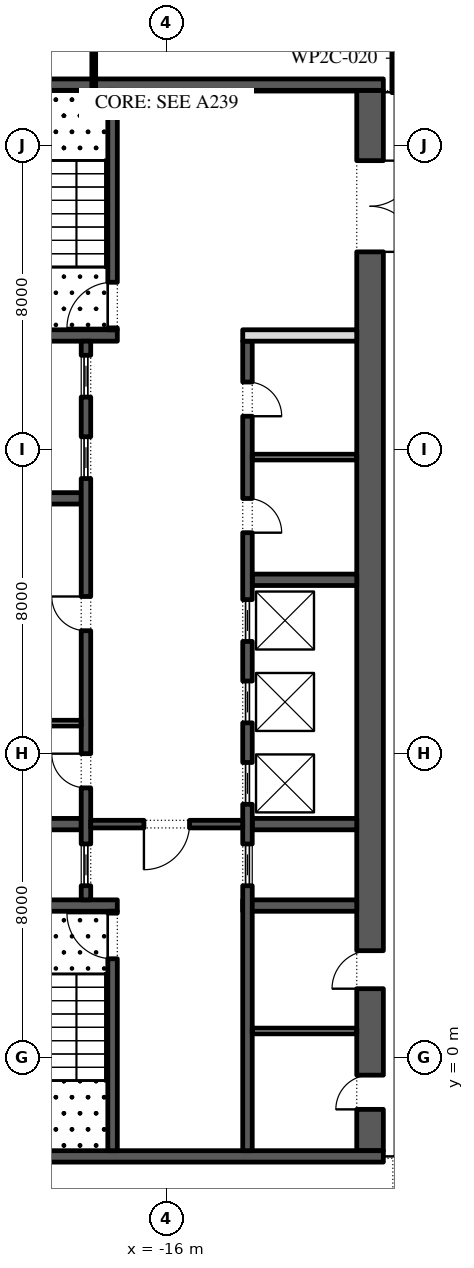
"""IFC4 building model, lengths in metres.
Left out: names, types, materials, properties, quantities, classifications, styles, units other than length and angle.
Written with IfcOpenShell. Run it as: python <this file> out.ifc"""

import sys

from ifc_helpers import new_model, si_unit, direction, frame, frame_2d, origin, place, context, subcontext, project, spatial, rectangle, extrude, element, fill, save


model = new_model("IFC4")
c1 = context("Model", 3, precision=1e-05, world=origin(), true_north=direction((0.0, 1.0)))
c2 = subcontext(c1, "Body", "Model", "MODEL_VIEW")
j1 = project(units=[si_unit("LENGTHUNIT", "METRE"), si_unit("PLANEANGLEUNIT", "RADIAN")], contexts=[c1])
p1 = place(None, origin())
s1 = spatial("IfcSite", under=j1, at=p1, CompositionType="ELEMENT")
p2 = place(p1, origin())
s2 = spatial("IfcBuilding", under=s1, at=p2, CompositionType="ELEMENT")
p3 = place(p2, frame((0.0, 0.0, 165.6)))
s3 = spatial("IfcBuildingStorey", under=s2, at=p3, CompositionType="ELEMENT", Elevation=165.6)
p4 = place(p3, frame((-10.65, -2.45, 0.0), z_axis=(0.0, 0.0, 1.0), x_axis=(0.0, 1.0, 0.0)))
e1 = element("IfcWall", 1, at=p4, inside=s3, PredefinedType="SHEAR", context=c2, shape_type="SweptSolid", body=[
    extrude(rectangle(XDim=27.9, YDim=0.7, at=frame_2d((13.95, 0.0))), origin(), (0.0, 0.0, 1.0), 5.8),
])
p5 = place(p4, frame((23.65, 0.0, 0.0)))
e2 = element("IfcOpeningElement", 2, at=p5, cuts=e1, PredefinedType="OPENING", context=c2, shape_type="SweptSolid", body=[
    extrude(rectangle(XDim=2.4, YDim=2.1, at=frame_2d((1.2, 1.05))), frame((0.0, 0.36, 0.0), z_axis=(0.0, -1.0, 0.0), x_axis=(1.0, 0.0, 0.0)), (0.0, 0.0, 1.0), 0.72),
])
p6 = place(p4, frame((1.087, 0.0, 0.0)))
e3 = element("IfcOpeningElement", 3, at=p6, cuts=e1, PredefinedType="OPENING", context=c2, shape_type="SweptSolid", body=[
    extrude(rectangle(XDim=0.9, YDim=2.1, at=frame_2d((0.45, 1.05))), frame((0.0, 0.36, 0.0), z_axis=(0.0, -1.0, 0.0), x_axis=(1.0, 0.0, 0.0)), (0.0, 0.0, 1.0), 0.72),
])
p7 = place(p4, frame((4.262, 0.0, 0.0)))
e4 = element("IfcOpeningElement", 4, at=p7, cuts=e1, PredefinedType="OPENING", context=c2, shape_type="SweptSolid", body=[
    extrude(rectangle(XDim=1.0, YDim=2.1, at=frame_2d((0.5, 1.05))), frame((0.0, 0.36, 0.0), z_axis=(0.0, -1.0, 0.0), x_axis=(1.0, 0.0, 0.0)), (0.0, 0.0, 1.0), 0.72),
])
for number, where, z_axis, x_axis in (
    (5, (-21.7, -2.6, 0.0), (0.0, 0.0, 1.0), (1.0, 0.0, 0.0)),
    (6, (-21.7, 25.6, 0.0), (0.0, 0.0, 1.0), (1.0, 0.0, 0.0)),
):
    element("IfcWall", number, at=place(p3, frame(where, z_axis=z_axis, x_axis=x_axis)), inside=s3, PredefinedType="SHEAR", context=c2, shape_type="SweptSolid", body=[
        extrude(rectangle(XDim=11.4, YDim=0.3, at=frame_2d((5.7, 0.0))), origin(), (0.0, 0.0, 1.0), 5.8),
    ])
p8 = place(p3, frame((-21.0, 4.0, 0.0), z_axis=(0.0, 0.0, 1.0), x_axis=(1.0, 0.0, 0.0)))
e7 = element("IfcWall", 7, at=p8, inside=s3, PredefinedType="SHEAR", context=c2, shape_type="SweptSolid", body=[
    extrude(rectangle(XDim=3.7, YDim=0.3, at=frame_2d((1.85, 0.0))), origin(), (0.0, 0.0, 1.0), 5.8),
])
p9 = place(p3, frame((-17.425, -2.45, 0.0), z_axis=(0.0, 0.0, 1.0), x_axis=(0.0, 1.0, 0.0)))
e8 = element("IfcWall", 8, at=p9, inside=s3, PredefinedType="SHEAR", context=c2, shape_type="SweptSolid", body=[
    extrude(rectangle(XDim=6.3, YDim=0.25, at=frame_2d((3.15, 0.0))), origin(), (0.0, 0.0, 1.0), 5.8),
])
p10 = place(p9, frame((5.05, 0.0, 0.0)))
e9 = element("IfcOpeningElement", 9, at=p10, cuts=e8, PredefinedType="OPENING", context=c2, shape_type="SweptSolid", body=[
    extrude(rectangle(XDim=1.2, YDim=2.1, at=frame_2d((0.6, 1.05))), frame((0.0, 0.135, 0.0), z_axis=(0.0, -1.0, 0.0), x_axis=(1.0, 0.0, 0.0)), (0.0, 0.0, 1.0), 0.27),
])
p11 = place(p3, frame((-21.0, 19.0, 0.0), z_axis=(0.0, 0.0, 1.0), x_axis=(1.0, 0.0, 0.0)))
e10 = element("IfcWall", 10, at=p11, inside=s3, PredefinedType="SHEAR", context=c2, shape_type="SweptSolid", body=[
    extrude(rectangle(XDim=3.7, YDim=0.3, at=frame_2d((1.85, 0.0))), origin(), (0.0, 0.0, 1.0), 5.8),
])
p12 = place(p3, frame((-17.425, 19.15, 0.0), z_axis=(0.0, 0.0, 1.0), x_axis=(0.0, 1.0, 0.0)))
e11 = element("IfcWall", 11, at=p12, inside=s3, PredefinedType="SHEAR", context=c2, shape_type="SweptSolid", body=[
    extrude(rectangle(XDim=6.3, YDim=0.25, at=frame_2d((3.15, 0.0))), origin(), (0.0, 0.0, 1.0), 5.8),
])
p13 = place(p12, frame((0.05, 0.0, 0.0)))
e12 = element("IfcOpeningElement", 12, at=p13, cuts=e11, PredefinedType="OPENING", context=c2, shape_type="SweptSolid", body=[
    extrude(rectangle(XDim=1.2, YDim=2.1, at=frame_2d((0.6, 1.05))), frame((0.0, 0.135, 0.0), z_axis=(0.0, -1.0, 0.0), x_axis=(1.0, 0.0, 0.0)), (0.0, 0.0, 1.0), 0.27),
])
for number, where, z_axis, x_axis in (
    (13, (-21.0, 6.143, 0.0), (0.0, 0.0, 1.0), (1.0, 0.0, 0.0)),
    (14, (-21.0, 14.714, 0.0), (0.0, 0.0, 1.0), (1.0, 0.0, 0.0)),
):
    element("IfcWall", number, at=place(p3, frame(where, z_axis=z_axis, x_axis=x_axis)), inside=s3, PredefinedType="SHEAR", context=c2, shape_type="SweptSolid", body=[
        extrude(rectangle(XDim=2.75, YDim=0.3, at=frame_2d((1.375, 0.0))), origin(), (0.0, 0.0, 1.0), 5.8),
    ])
p14 = place(p3, frame((-18.125, 4.15, 0.0), z_axis=(0.0, 0.0, 1.0), x_axis=(0.0, 1.0, 0.0)))
e15 = element("IfcWall", 15, at=p14, inside=s3, PredefinedType="SHEAR", context=c2, shape_type="SweptSolid", body=[
    extrude(rectangle(XDim=14.7, YDim=0.25, at=frame_2d((7.35, 0.0))), origin(), (0.0, 0.0, 1.0), 5.8),
])
p15 = place(p14, frame((2.946, 0.0, 0.0)))
e16 = element("IfcOpeningElement", 16, at=p15, cuts=e15, PredefinedType="OPENING", context=c2, shape_type="SweptSolid", body=[
    extrude(rectangle(XDim=0.9, YDim=2.1, at=frame_2d((0.45, 1.05))), frame((0.0, 0.135, 0.0), z_axis=(0.0, -1.0, 0.0), x_axis=(1.0, 0.0, 0.0)), (0.0, 0.0, 1.0), 0.27),
])
p16 = place(p14, frame((7.082, 0.0, 0.0)))
e17 = element("IfcOpeningElement", 17, at=p16, cuts=e15, PredefinedType="OPENING", context=c2, shape_type="SweptSolid", body=[
    extrude(rectangle(XDim=0.9, YDim=2.1, at=frame_2d((0.45, 1.05))), frame((0.0, 0.135, 0.0), z_axis=(0.0, -1.0, 0.0), x_axis=(1.0, 0.0, 0.0)), (0.0, 0.0, 1.0), 0.27),
])
p17 = place(p14, frame((0.371, 0.0, 0.0)))
e18 = element("IfcOpeningElement", 18, at=p17, cuts=e15, PredefinedType="OPENING", context=c2, shape_type="SweptSolid", body=[
    extrude(rectangle(XDim=1.1, YDim=2.1, at=frame_2d((0.55, 1.05))), frame((0.0, 0.135, 0.0), z_axis=(0.0, -1.0, 0.0), x_axis=(1.0, 0.0, 0.0)), (0.0, 0.0, 1.0), 0.27),
])
p18 = place(p14, frame((11.086, 0.0, 0.0)))
e19 = element("IfcOpeningElement", 19, at=p18, cuts=e15, PredefinedType="OPENING", context=c2, shape_type="SweptSolid", body=[
    extrude(rectangle(XDim=1.1, YDim=2.1, at=frame_2d((0.55, 1.05))), frame((0.0, 0.135, 0.0), z_axis=(0.0, -1.0, 0.0), x_axis=(1.0, 0.0, 0.0)), (0.0, 0.0, 1.0), 0.27),
])
p19 = place(p14, frame((13.229, 0.0, 0.0)))
e20 = element("IfcOpeningElement", 20, at=p19, cuts=e15, PredefinedType="OPENING", context=c2, shape_type="SweptSolid", body=[
    extrude(rectangle(XDim=1.1, YDim=2.1, at=frame_2d((0.55, 1.05))), frame((0.0, 0.135, 0.0), z_axis=(0.0, -1.0, 0.0), x_axis=(1.0, 0.0, 0.0)), (0.0, 0.0, 1.0), 0.27),
])
p20 = place(p3, frame((-21.0, 8.8, 0.0), z_axis=(0.0, 0.0, 1.0), x_axis=(1.0, 0.0, 0.0)))
e21 = element("IfcWall", 21, at=p20, inside=s3, PredefinedType="PARTITIONING", context=c2, shape_type="SweptSolid", body=[
    extrude(rectangle(XDim=2.75, YDim=0.15, at=frame_2d((1.375, 0.0))), origin(), (0.0, 0.0, 1.0), 5.8),
])
p21 = place(p3, frame((-14.0, 4.0, 0.0), z_axis=(0.0, 0.0, 1.0), x_axis=(1.0, 0.0, 0.0)))
e22 = element("IfcWall", 22, at=p21, inside=s3, PredefinedType="SHEAR", context=c2, shape_type="SweptSolid", body=[
    extrude(rectangle(XDim=3.0, YDim=0.3, at=frame_2d((1.5, 0.0))), origin(), (0.0, 0.0, 1.0), 5.8),
])
for number, where, z_axis, x_axis in (
    (23, (-13.75, 6.143, 0.0), (0.0, 0.0, 1.0), (1.0, 0.0, 0.0)),
    (24, (-13.75, 12.571, 0.0), (0.0, 0.0, 1.0), (1.0, 0.0, 0.0)),
):
    element("IfcWall", number, at=place(p3, frame(where, z_axis=z_axis, x_axis=x_axis)), inside=s3, PredefinedType="SHEAR", context=c2, shape_type="SweptSolid", body=[
        extrude(rectangle(XDim=2.75, YDim=0.3, at=frame_2d((1.375, 0.0))), origin(), (0.0, 0.0, 1.0), 5.8),
    ])
p22 = place(p3, frame((-13.875, -2.45, 0.0), z_axis=(0.0, 0.0, 1.0), x_axis=(0.0, 1.0, 0.0)))
e25 = element("IfcWall", 25, at=p22, inside=s3, PredefinedType="SHEAR", context=c2, shape_type="SweptSolid", body=[
    extrude(rectangle(XDim=21.3, YDim=0.25, at=frame_2d((10.65, 0.0))), origin(), (0.0, 0.0, 1.0), 5.8),
])
p23 = place(p22, frame((16.261, 0.0, 0.0)))
e26 = element("IfcOpeningElement", 26, at=p23, cuts=e25, PredefinedType="OPENING", context=c2, shape_type="SweptSolid", body=[
    extrude(rectangle(XDim=0.9, YDim=2.1, at=frame_2d((0.45, 1.05))), frame((0.0, 0.135, 0.0), z_axis=(0.0, -1.0, 0.0), x_axis=(1.0, 0.0, 0.0)), (0.0, 0.0, 1.0), 0.27),
])
p24 = place(p22, frame((19.325, 0.0, 0.0)))
e27 = element("IfcOpeningElement", 27, at=p24, cuts=e25, PredefinedType="OPENING", context=c2, shape_type="SweptSolid", body=[
    extrude(rectangle(XDim=0.9, YDim=2.1, at=frame_2d((0.45, 1.05))), frame((0.0, 0.135, 0.0), z_axis=(0.0, -1.0, 0.0), x_axis=(1.0, 0.0, 0.0)), (0.0, 0.0, 1.0), 0.27),
])
p25 = place(p22, frame((6.971, 0.0, 0.0)))
e28 = element("IfcOpeningElement", 28, at=p25, cuts=e25, PredefinedType="OPENING", context=c2, shape_type="SweptSolid", body=[
    extrude(rectangle(XDim=1.1, YDim=2.1, at=frame_2d((0.55, 1.05))), frame((0.0, 0.135, 0.0), z_axis=(0.0, -1.0, 0.0), x_axis=(1.0, 0.0, 0.0)), (0.0, 0.0, 1.0), 0.27),
])
p26 = place(p22, frame((9.114, 0.0, 0.0)))
e29 = element("IfcOpeningElement", 29, at=p26, cuts=e25, PredefinedType="OPENING", context=c2, shape_type="SweptSolid", body=[
    extrude(rectangle(XDim=1.1, YDim=2.1, at=frame_2d((0.55, 1.05))), frame((0.0, 0.135, 0.0), z_axis=(0.0, -1.0, 0.0), x_axis=(1.0, 0.0, 0.0)), (0.0, 0.0, 1.0), 0.27),
])
p27 = place(p22, frame((11.257, 0.0, 0.0)))
e30 = element("IfcOpeningElement", 30, at=p27, cuts=e25, PredefinedType="OPENING", context=c2, shape_type="SweptSolid", body=[
    extrude(rectangle(XDim=1.1, YDim=2.1, at=frame_2d((0.55, 1.05))), frame((0.0, 0.135, 0.0), z_axis=(0.0, -1.0, 0.0), x_axis=(1.0, 0.0, 0.0)), (0.0, 0.0, 1.0), 0.27),
])
p28 = place(p22, frame((13.4, 0.0, 0.0)))
e31 = element("IfcOpeningElement", 31, at=p28, cuts=e25, PredefinedType="OPENING", context=c2, shape_type="SweptSolid", body=[
    extrude(rectangle(XDim=1.1, YDim=2.1, at=frame_2d((0.55, 1.05))), frame((0.0, 0.135, 0.0), z_axis=(0.0, -1.0, 0.0), x_axis=(1.0, 0.0, 0.0)), (0.0, 0.0, 1.0), 0.27),
])
p29 = place(p3, frame((-14.0, 19.0, 0.0), z_axis=(0.0, 0.0, 1.0), x_axis=(1.0, 0.0, 0.0)))
e32 = element("IfcWall", 32, at=p29, inside=s3, PredefinedType="PARTITIONING", context=c2, shape_type="SweptSolid", body=[
    extrude(rectangle(XDim=3.0, YDim=0.3, at=frame_2d((1.5, 0.0))), origin(), (0.0, 0.0, 1.0), 5.8),
])
p30 = place(p3, frame((-13.75, 15.8, 0.0), z_axis=(0.0, 0.0, 1.0), x_axis=(1.0, 0.0, 0.0)))
e33 = element("IfcWall", 33, at=p30, inside=s3, PredefinedType="PARTITIONING", context=c2, shape_type="SweptSolid", body=[
    extrude(rectangle(XDim=2.75, YDim=0.15, at=frame_2d((1.375, 0.0))), origin(), (0.0, 0.0, 1.0), 5.8),
])
p31 = place(p3, frame((-18.0, 6.143, 0.0), z_axis=(0.0, 0.0, 1.0), x_axis=(1.0, 0.0, 0.0)))
e34 = element("IfcWall", 34, at=p31, inside=s3, PredefinedType="SHEAR", context=c2, shape_type="SweptSolid", body=[
    extrude(rectangle(XDim=4.0, YDim=0.2, at=frame_2d((2.0, 0.0))), origin(), (0.0, 0.0, 1.0), 5.8),
])
p32 = place(p31, frame((1.4, 0.0, 0.0)))
e35 = element("IfcOpeningElement", 35, at=p32, cuts=e34, PredefinedType="OPENING", context=c2, shape_type="SweptSolid", body=[
    extrude(rectangle(XDim=1.2, YDim=2.1, at=frame_2d((0.6, 1.05))), frame((0.0, 0.11, 0.0), z_axis=(0.0, -1.0, 0.0), x_axis=(1.0, 0.0, 0.0)), (0.0, 0.0, 1.0), 0.22),
])
p33 = place(p3, frame((-13.75, 0.7, 0.0), z_axis=(0.0, 0.0, 1.0), x_axis=(1.0, 0.0, 0.0)))
e36 = element("IfcWall", 36, at=p33, inside=s3, PredefinedType="PARTITIONING", context=c2, shape_type="SweptSolid", body=[
    extrude(rectangle(XDim=2.75, YDim=0.15, at=frame_2d((1.375, 0.0))), origin(), (0.0, 0.0, 1.0), 5.8),
])
p34 = place(p3, frame((-17.92, 25.4, 0.0), z_axis=(0.0, 0.0, 1.0), x_axis=(0.0, 1.0, 0.0)))
e37 = element("IfcWall", 37, at=p34, inside=s3, PredefinedType="PARTITIONING", context=c2, shape_type="SweptSolid", body=[
    extrude(rectangle(XDim=11.987, YDim=0.1, at=frame_2d((5.994, 0.0))), origin(), (0.0, 0.0, 1.0), 5.8),
])
p35 = place(p34, frame((4.36, 0.0, 0.0)))
e38 = element("IfcOpeningElement", 38, at=p35, cuts=e37, PredefinedType="OPENING", context=c2, shape_type="SweptSolid", body=[
    extrude(rectangle(XDim=0.9, YDim=2.1, at=frame_2d((0.45, 1.05))), frame((0.0, 0.06, 0.0), z_axis=(0.0, -1.0, 0.0), x_axis=(1.0, 0.0, 0.0)), (0.0, 0.0, 1.0), 0.12),
])
p36 = place(p3, frame((-10.0, 25.39, 0.0), z_axis=(0.0, 0.0, 1.0), x_axis=(0.0, 1.0, 0.0)))
e39 = element("IfcWall", 39, at=p36, inside=s3, PredefinedType="PARTITIONING", context=c2, shape_type="SweptSolid", body=[
    extrude(rectangle(XDim=1.81, YDim=0.15, at=frame_2d((0.905, 0.0))), origin(), (0.0, 0.0, 1.0), 5.8),
])
p37 = place(p15, origin())
e40 = element("IfcDoor", 40, at=p37, inside=s3, OperationType="SINGLE_SWING_LEFT", PredefinedType="DOOR", context=c2, shape_type="SweptSolid", body=[
    extrude(rectangle(XDim=0.9, YDim=2.1, at=frame_2d((0.45, 1.05))), frame((0.0, 0.125, 0.0), z_axis=(0.0, -1.0, 0.0), x_axis=(1.0, 0.0, 0.0)), (0.0, 0.0, 1.0), 0.05),
])
fill(e16, e40)
p38 = place(p16, origin())
e41 = element("IfcDoor", 41, at=p38, inside=s3, OperationType="SINGLE_SWING_LEFT", PredefinedType="DOOR", context=c2, shape_type="SweptSolid", body=[
    extrude(rectangle(XDim=0.9, YDim=2.1, at=frame_2d((0.45, 1.05))), frame((0.0, 0.125, 0.0), z_axis=(0.0, -1.0, 0.0), x_axis=(1.0, 0.0, 0.0)), (0.0, 0.0, 1.0), 0.05),
])
fill(e17, e41)
p39 = place(p17, origin())
e42 = element("IfcDoor", 42, at=p39, inside=s3, OperationType="SLIDING_TO_LEFT", PredefinedType="DOOR", context=c2, shape_type="SweptSolid", body=[
    extrude(rectangle(XDim=1.1, YDim=2.1, at=frame_2d((0.55, 1.05))), frame((0.0, 0.025, 0.0), z_axis=(0.0, -1.0, 0.0), x_axis=(1.0, 0.0, 0.0)), (0.0, 0.0, 1.0), 0.05),
])
fill(e18, e42)
p40 = place(p18, origin())
e43 = element("IfcDoor", 43, at=p40, inside=s3, OperationType="SLIDING_TO_LEFT", PredefinedType="DOOR", context=c2, shape_type="SweptSolid", body=[
    extrude(rectangle(XDim=1.1, YDim=2.1, at=frame_2d((0.55, 1.05))), frame((0.0, 0.025, 0.0), z_axis=(0.0, -1.0, 0.0), x_axis=(1.0, 0.0, 0.0)), (0.0, 0.0, 1.0), 0.05),
])
fill(e19, e43)
p41 = place(p19, origin())
e44 = element("IfcDoor", 44, at=p41, inside=s3, OperationType="SLIDING_TO_LEFT", PredefinedType="DOOR", context=c2, shape_type="SweptSolid", body=[
    extrude(rectangle(XDim=1.1, YDim=2.1, at=frame_2d((0.55, 1.05))), frame((0.0, 0.025, 0.0), z_axis=(0.0, -1.0, 0.0), x_axis=(1.0, 0.0, 0.0)), (0.0, 0.0, 1.0), 0.05),
])
fill(e20, e44)
p42 = place(p23, frame((0.9, -0.2, 0.0), z_axis=(0.0, 0.0, 1.0), x_axis=(-1.0, 0.0, 0.0)))
e45 = element("IfcDoor", 45, at=p42, inside=s3, OperationType="SINGLE_SWING_LEFT", PredefinedType="DOOR", context=c2, shape_type="SweptSolid", body=[
    extrude(rectangle(XDim=0.9, YDim=2.1, at=frame_2d((0.45, 1.05))), frame((0.0, -0.075, 0.0), z_axis=(0.0, -1.0, 0.0), x_axis=(1.0, 0.0, 0.0)), (0.0, 0.0, 1.0), 0.05),
])
fill(e26, e45)
p43 = place(p24, frame((0.9, -0.2, 0.0), z_axis=(0.0, 0.0, 1.0), x_axis=(-1.0, 0.0, 0.0)))
e46 = element("IfcDoor", 46, at=p43, inside=s3, OperationType="SINGLE_SWING_LEFT", PredefinedType="DOOR", context=c2, shape_type="SweptSolid", body=[
    extrude(rectangle(XDim=0.9, YDim=2.1, at=frame_2d((0.45, 1.05))), frame((0.0, -0.075, 0.0), z_axis=(0.0, -1.0, 0.0), x_axis=(1.0, 0.0, 0.0)), (0.0, 0.0, 1.0), 0.05),
])
fill(e27, e46)
p44 = place(p25, origin())
e47 = element("IfcDoor", 47, at=p44, inside=s3, OperationType="SLIDING_TO_LEFT", PredefinedType="DOOR", context=c2, shape_type="SweptSolid", body=[
    extrude(rectangle(XDim=1.1, YDim=2.1, at=frame_2d((0.55, 1.05))), frame((0.0, 0.025, 0.0), z_axis=(0.0, -1.0, 0.0), x_axis=(1.0, 0.0, 0.0)), (0.0, 0.0, 1.0), 0.05),
])
fill(e28, e47)
p45 = place(p26, origin())
e48 = element("IfcDoor", 48, at=p45, inside=s3, OperationType="SLIDING_TO_LEFT", PredefinedType="DOOR", context=c2, shape_type="SweptSolid", body=[
    extrude(rectangle(XDim=1.1, YDim=2.1, at=frame_2d((0.55, 1.05))), frame((0.0, 0.025, 0.0), z_axis=(0.0, -1.0, 0.0), x_axis=(1.0, 0.0, 0.0)), (0.0, 0.0, 1.0), 0.05),
])
fill(e29, e48)
p46 = place(p27, origin())
e49 = element("IfcDoor", 49, at=p46, inside=s3, OperationType="SLIDING_TO_LEFT", PredefinedType="DOOR", context=c2, shape_type="SweptSolid", body=[
    extrude(rectangle(XDim=1.1, YDim=2.1, at=frame_2d((0.55, 1.05))), frame((0.0, 0.025, 0.0), z_axis=(0.0, -1.0, 0.0), x_axis=(1.0, 0.0, 0.0)), (0.0, 0.0, 1.0), 0.05),
])
fill(e30, e49)
p47 = place(p28, origin())
e50 = element("IfcDoor", 50, at=p47, inside=s3, OperationType="SLIDING_TO_LEFT", PredefinedType="DOOR", context=c2, shape_type="SweptSolid", body=[
    extrude(rectangle(XDim=1.1, YDim=2.1, at=frame_2d((0.55, 1.05))), frame((0.0, 0.025, 0.0), z_axis=(0.0, -1.0, 0.0), x_axis=(1.0, 0.0, 0.0)), (0.0, 0.0, 1.0), 0.05),
])
fill(e31, e50)
p48 = place(p32, frame((1.2, 0.0, 0.0), z_axis=(0.0, 0.0, 1.0), x_axis=(-1.0, 0.0, 0.0)))
e51 = element("IfcDoor", 51, at=p48, inside=s3, OperationType="SINGLE_SWING_LEFT", PredefinedType="DOOR", context=c2, shape_type="SweptSolid", body=[
    extrude(rectangle(XDim=1.2, YDim=2.1, at=frame_2d((0.6, 1.05))), frame((0.0, 0.025, 0.0), z_axis=(0.0, -1.0, 0.0), x_axis=(1.0, 0.0, 0.0)), (0.0, 0.0, 1.0), 0.05),
])
fill(e35, e51)
p49 = place(p5, frame((2.4, 0.0, 0.0), z_axis=(0.0, 0.0, 1.0), x_axis=(-1.0, 0.0, 0.0)))
e52 = element("IfcDoor", 52, at=p49, inside=s3, OperationType="DOUBLE_DOOR_SINGLE_SWING", PredefinedType="DOOR", context=c2, shape_type="SweptSolid", body=[
    extrude(rectangle(XDim=2.4, YDim=2.1, at=frame_2d((1.2, 1.05))), frame((0.0, 0.025, 0.0), z_axis=(0.0, -1.0, 0.0), x_axis=(1.0, 0.0, 0.0)), (0.0, 0.0, 1.0), 0.05),
])
fill(e2, e52)
p50 = place(p10, origin())
e53 = element("IfcDoor", 53, at=p50, inside=s3, OperationType="SINGLE_SWING_LEFT", PredefinedType="DOOR", context=c2, shape_type="SweptSolid", body=[
    extrude(rectangle(XDim=1.2, YDim=2.1, at=frame_2d((0.6, 1.05))), frame((0.0, 0.025, 0.0), z_axis=(0.0, -1.0, 0.0), x_axis=(1.0, 0.0, 0.0)), (0.0, 0.0, 1.0), 0.05),
])
fill(e9, e53)
p51 = place(p13, origin())
e54 = element("IfcDoor", 54, at=p51, inside=s3, OperationType="SINGLE_SWING_RIGHT", PredefinedType="DOOR", context=c2, shape_type="SweptSolid", body=[
    extrude(rectangle(XDim=1.2, YDim=2.1, at=frame_2d((0.6, 1.05))), frame((0.0, 0.025, 0.0), z_axis=(0.0, -1.0, 0.0), x_axis=(1.0, 0.0, 0.0)), (0.0, 0.0, 1.0), 0.05),
])
fill(e12, e54)
p52 = place(p6, origin())
e55 = element("IfcDoor", 55, at=p52, inside=s3, OperationType="SINGLE_SWING_RIGHT", PredefinedType="DOOR", context=c2, shape_type="SweptSolid", body=[
    extrude(rectangle(XDim=0.9, YDim=2.1, at=frame_2d((0.45, 1.05))), frame((0.0, 0.35, 0.0), z_axis=(0.0, -1.0, 0.0), x_axis=(1.0, 0.0, 0.0)), (0.0, 0.0, 1.0), 0.05),
])
fill(e3, e55)
p53 = place(p7, origin())
e56 = element("IfcDoor", 56, at=p53, inside=s3, OperationType="SINGLE_SWING_RIGHT", PredefinedType="DOOR", context=c2, shape_type="SweptSolid", body=[
    extrude(rectangle(XDim=1.0, YDim=2.1, at=frame_2d((0.5, 1.05))), frame((0.0, 0.35, 0.0), z_axis=(0.0, -1.0, 0.0), x_axis=(1.0, 0.0, 0.0)), (0.0, 0.0, 1.0), 0.05),
])
fill(e4, e56)
save(model, sys.argv[1])
